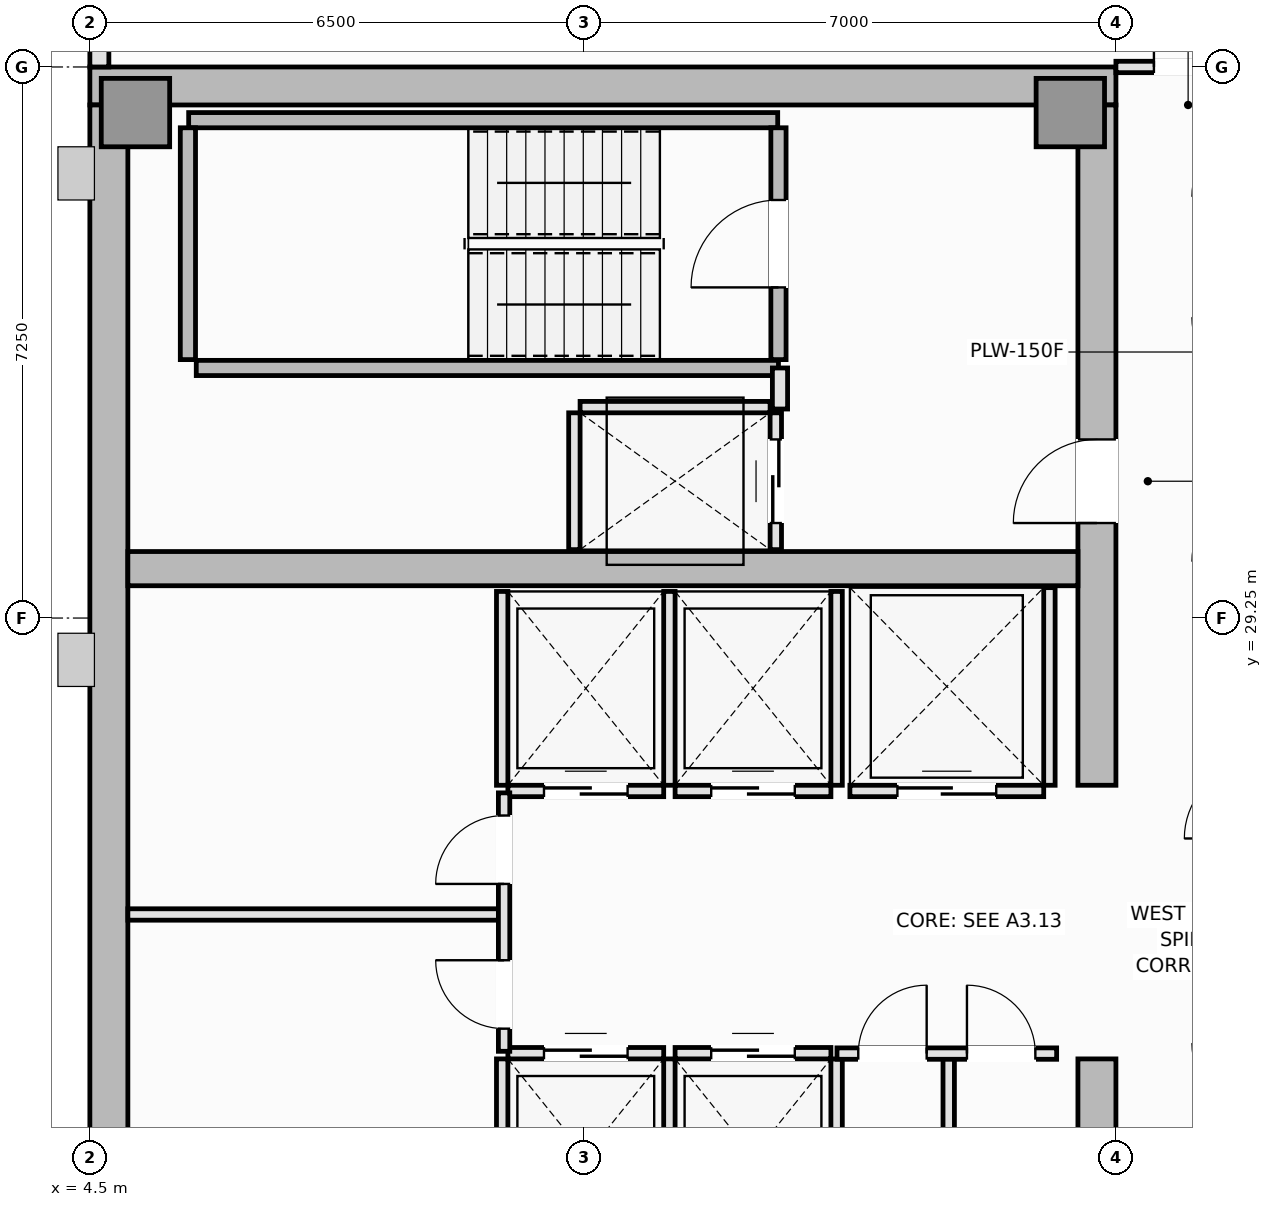
"""IFC4 building model, lengths in metres.
Left out: names, types, materials, properties, quantities, classifications, styles, units other than length and angle.
Written with IfcOpenShell. Run it as: python <this file> out.ifc"""

import sys

from ifc_helpers import new_model, si_unit, direction, frame, frame_2d, origin, origin_2d, place, context, subcontext, project, spatial, rectangle, extrude, element, fill, save


model = new_model("IFC4")
c1 = context("Model", 3, precision=1e-05, world=origin(), true_north=direction((0.0, 1.0)))
c2 = subcontext(c1, "Body", "Model", "MODEL_VIEW")
j1 = project(units=[si_unit("LENGTHUNIT", "METRE"), si_unit("PLANEANGLEUNIT", "RADIAN")], contexts=[c1])
p1 = place(None, origin())
s1 = spatial("IfcSite", under=j1, at=p1, CompositionType="ELEMENT")
p2 = place(p1, origin())
s2 = spatial("IfcBuilding", under=s1, at=p2, CompositionType="ELEMENT")
p3 = place(p2, frame((0.0, 0.0, 270.55)))
s3 = spatial("IfcBuildingStorey", under=s2, at=p3, CompositionType="ELEMENT", Elevation=270.55)
p4 = place(p3, frame((4.5, 36.25, 0.0), z_axis=(0.0, 0.0, 1.0), x_axis=(1.0, 0.0, 0.0)))
e1 = element("IfcWall", 1, at=p4, inside=s3, PredefinedType="SHEAR", context=c2, shape_type="SweptSolid", body=[
    extrude(rectangle(XDim=13.5, YDim=0.5, at=frame_2d((6.75, 0.0))), origin(), (0.0, 0.0, 1.0), 3.55),
])
p5 = place(p3, frame((4.75, 14.5, 0.0), z_axis=(0.0, 0.0, 1.0), x_axis=(0.0, 1.0, 0.0)))
e2 = element("IfcWall", 2, at=p5, inside=s3, PredefinedType="SHEAR", context=c2, shape_type="SweptSolid", body=[
    extrude(rectangle(XDim=21.5, YDim=0.5, at=frame_2d((10.75, 0.0))), origin(), (0.0, 0.0, 1.0), 3.55),
])
p6 = place(p3, frame((17.75, 14.5, 0.0), z_axis=(0.0, 0.0, 1.0), x_axis=(0.0, 1.0, 0.0)))
e3 = element("IfcWall", 3, at=p6, inside=s3, PredefinedType="SHEAR", context=c2, shape_type="SweptSolid", body=[
    extrude(rectangle(XDim=8.95, YDim=0.5, at=frame_2d((4.475, 0.0))), origin(), (0.0, 0.0, 1.0), 3.55),
])
p7 = place(p6, frame((4.4, 0.0, 0.0)))
e4 = element("IfcOpeningElement", 4, at=p7, cuts=e3, PredefinedType="OPENING", context=c2, shape_type="SweptSolid", body=[
    extrude(rectangle(XDim=1.1, YDim=2.15, at=frame_2d((0.55, 1.075))), frame((0.0, 0.26, 0.0), z_axis=(0.0, -1.0, 0.0), x_axis=(1.0, 0.0, 0.0)), (0.0, 0.0, 1.0), 0.52),
])
p8 = place(p3, frame((17.75, 27.05, 0.0), z_axis=(0.0, 0.0, 1.0), x_axis=(0.0, 1.0, 0.0)))
e5 = element("IfcWall", 5, at=p8, inside=s3, PredefinedType="SHEAR", context=c2, shape_type="SweptSolid", body=[
    extrude(rectangle(XDim=8.95, YDim=0.5, at=frame_2d((4.475, 0.0))), origin(), (0.0, 0.0, 1.0), 3.55),
])
p9 = place(p8, frame((3.45, 0.0, 0.0)))
e6 = element("IfcOpeningElement", 6, at=p9, cuts=e5, PredefinedType="OPENING", context=c2, shape_type="SweptSolid", body=[
    extrude(rectangle(XDim=1.1, YDim=2.15, at=frame_2d((0.55, 1.075))), frame((0.0, 0.26, 0.0), z_axis=(0.0, -1.0, 0.0), x_axis=(1.0, 0.0, 0.0)), (0.0, 0.0, 1.0), 0.52),
])
p10 = place(p3, frame((5.0, 29.9, 0.0), z_axis=(0.0, 0.0, 1.0), x_axis=(1.0, 0.0, 0.0)))
e7 = element("IfcWall", 7, at=p10, inside=s3, PredefinedType="SHEAR", context=c2, shape_type="SweptSolid", body=[
    extrude(rectangle(XDim=12.5, YDim=0.45, at=frame_2d((6.25, 0.0))), origin(), (0.0, 0.0, 1.0), 3.55),
])
for number, where, z_axis, x_axis in (
    (8, (5.1, 35.9, 0.0), (0.0, 0.0, 1.0), (1.0, 0.0, 0.0)),
    (9, (17.4, 35.9, 0.0), (0.0, 0.0, 1.0), (1.0, 0.0, 0.0)),
):
    element("IfcColumn", number, at=place(p3, frame(where, z_axis=z_axis, x_axis=x_axis)), inside=s3, PredefinedType="PILASTER", context=c2, shape_type="SweptSolid", body=[
        extrude(rectangle(XDim=0.9, YDim=0.9, at=origin_2d()), origin(), (0.0, 0.0, 1.0), 3.55),
    ])
p11 = place(p3, frame((4.625, 39.4, 0.0), z_axis=(0.0, 0.0, 1.0), x_axis=(0.0, -1.0, 0.0)))
e10 = element("IfcWall", 10, at=p11, inside=s3, PredefinedType="SOLIDWALL", context=c2, shape_type="SweptSolid", body=[
    extrude(rectangle(XDim=2.9, YDim=0.25, at=frame_2d((1.45, 0.0))), origin(), (0.0, 0.0, 1.0), 3.39),
])
p12 = place(p3, frame((5.8, 35.8, 0.0), z_axis=(0.0, 0.0, 1.0), x_axis=(1.0, 0.0, 0.0)))
e11 = element("IfcWall", 11, at=p12, inside=s3, PredefinedType="SOLIDWALL", context=c2, shape_type="SweptSolid", body=[
    extrude(rectangle(XDim=7.75, YDim=0.2, at=frame_2d((3.875, 0.0))), origin(), (0.0, 0.0, 1.0), 3.55),
])
p13 = place(p3, frame((5.79, 32.65, 0.0), z_axis=(0.0, 0.0, 1.0), x_axis=(0.0, 1.0, 0.0)))
e12 = element("IfcWall", 12, at=p13, inside=s3, PredefinedType="SOLIDWALL", context=c2, shape_type="SweptSolid", body=[
    extrude(rectangle(XDim=3.05, YDim=0.2, at=frame_2d((1.525, 0.0))), origin(), (0.0, 0.0, 1.0), 3.55),
])
p14 = place(p3, frame((5.9, 32.54, 0.0), z_axis=(0.0, 0.0, 1.0), x_axis=(1.0, 0.0, 0.0)))
e13 = element("IfcWall", 13, at=p14, inside=s3, PredefinedType="SOLIDWALL", context=c2, shape_type="SweptSolid", body=[
    extrude(rectangle(XDim=7.66, YDim=0.2, at=frame_2d((3.83, 0.0))), origin(), (0.0, 0.0, 1.0), 3.55),
])
p15 = place(p3, frame((13.56, 32.65, 0.0), z_axis=(0.0, 0.0, 1.0), x_axis=(0.0, 1.0, 0.0)))
e14 = element("IfcWall", 14, at=p15, inside=s3, PredefinedType="SOLIDWALL", context=c2, shape_type="SweptSolid", body=[
    extrude(rectangle(XDim=3.05, YDim=0.2, at=frame_2d((1.525, 0.0))), origin(), (0.0, 0.0, 1.0), 3.55),
])
p16 = place(p15, frame((0.95, 0.0, 0.0)))
e15 = element("IfcOpeningElement", 15, at=p16, cuts=e14, PredefinedType="OPENING", context=c2, shape_type="SweptSolid", body=[
    extrude(rectangle(XDim=1.15, YDim=2.15, at=frame_2d((0.575, 1.075))), frame((0.0, 0.11, 0.0), z_axis=(0.0, -1.0, 0.0), x_axis=(1.0, 0.0, 0.0)), (0.0, 0.0, 1.0), 0.22),
])
p17 = place(p3, frame((10.0, 23.525, 0.0), z_axis=(0.0, 0.0, 1.0), x_axis=(1.0, 0.0, 0.0)))
e16 = element("IfcWall", 16, at=p17, inside=s3, PredefinedType="PARTITIONING", context=c2, shape_type="SweptSolid", body=[
    extrude(rectangle(XDim=2.05, YDim=0.15, at=frame_2d((1.025, 0.0))), origin(), (0.0, 0.0, 1.0), 3.39),
])
p18 = place(p17, frame((0.475, 0.0, 0.0)))
e17 = element("IfcOpeningElement", 17, at=p18, cuts=e16, PredefinedType="OPENING", context=c2, shape_type="SweptSolid", body=[
    extrude(rectangle(XDim=1.1, YDim=2.2, at=frame_2d((0.55, 1.1))), frame((0.0, 0.085, 0.0), z_axis=(0.0, -1.0, 0.0), x_axis=(1.0, 0.0, 0.0)), (0.0, 0.0, 1.0), 0.17),
])
for number, where, z_axis, x_axis in (
    (18, (9.925, 20.9, 0.0), (0.0, 0.0, 1.0), (0.0, 1.0, 0.0)),
    (19, (12.125, 20.9, 0.0), (0.0, 0.0, 1.0), (0.0, 1.0, 0.0)),
):
    element("IfcWall", number, at=place(p3, frame(where, z_axis=z_axis, x_axis=x_axis)), inside=s3, PredefinedType="PARTITIONING", context=c2, shape_type="SweptSolid", body=[
        extrude(rectangle(XDim=2.55, YDim=0.15, at=frame_2d((1.275, 0.0))), origin(), (0.0, 0.0, 1.0), 3.39),
    ])
p19 = place(p3, frame((12.2, 23.525, 0.0), z_axis=(0.0, 0.0, 1.0), x_axis=(1.0, 0.0, 0.0)))
e20 = element("IfcWall", 20, at=p19, inside=s3, PredefinedType="PARTITIONING", context=c2, shape_type="SweptSolid", body=[
    extrude(rectangle(XDim=2.05, YDim=0.15, at=frame_2d((1.025, 0.0))), origin(), (0.0, 0.0, 1.0), 3.39),
])
p20 = place(p19, frame((0.475, 0.0, 0.0)))
e21 = element("IfcOpeningElement", 21, at=p20, cuts=e20, PredefinedType="OPENING", context=c2, shape_type="SweptSolid", body=[
    extrude(rectangle(XDim=1.1, YDim=2.2, at=frame_2d((0.55, 1.1))), frame((0.0, 0.085, 0.0), z_axis=(0.0, -1.0, 0.0), x_axis=(1.0, 0.0, 0.0)), (0.0, 0.0, 1.0), 0.17),
])
p21 = place(p3, frame((14.325, 20.9, 0.0), z_axis=(0.0, 0.0, 1.0), x_axis=(0.0, 1.0, 0.0)))
e22 = element("IfcWall", 22, at=p21, inside=s3, PredefinedType="PARTITIONING", context=c2, shape_type="SweptSolid", body=[
    extrude(rectangle(XDim=2.55, YDim=0.15, at=frame_2d((1.275, 0.0))), origin(), (0.0, 0.0, 1.0), 3.39),
])
p22 = place(p3, frame((10.0, 26.975, 0.0), z_axis=(0.0, 0.0, 1.0), x_axis=(1.0, 0.0, 0.0)))
e23 = element("IfcWall", 23, at=p22, inside=s3, PredefinedType="PARTITIONING", context=c2, shape_type="SweptSolid", body=[
    extrude(rectangle(XDim=2.05, YDim=0.15, at=frame_2d((1.025, 0.0))), origin(), (0.0, 0.0, 1.0), 3.39),
])
p23 = place(p22, frame((0.475, 0.0, 0.0)))
e24 = element("IfcOpeningElement", 24, at=p23, cuts=e23, PredefinedType="OPENING", context=c2, shape_type="SweptSolid", body=[
    extrude(rectangle(XDim=1.1, YDim=2.2, at=frame_2d((0.55, 1.1))), frame((0.0, 0.085, 0.0), z_axis=(0.0, -1.0, 0.0), x_axis=(1.0, 0.0, 0.0)), (0.0, 0.0, 1.0), 0.17),
])
for number, where, z_axis, x_axis in (
    (25, (9.925, 27.05, 0.0), (0.0, 0.0, 1.0), (0.0, 1.0, 0.0)),
    (26, (12.125, 27.05, 0.0), (0.0, 0.0, 1.0), (0.0, 1.0, 0.0)),
):
    element("IfcWall", number, at=place(p3, frame(where, z_axis=z_axis, x_axis=x_axis)), inside=s3, PredefinedType="PARTITIONING", context=c2, shape_type="SweptSolid", body=[
        extrude(rectangle(XDim=2.55, YDim=0.15, at=frame_2d((1.275, 0.0))), origin(), (0.0, 0.0, 1.0), 3.39),
    ])
p24 = place(p3, frame((12.2, 26.975, 0.0), z_axis=(0.0, 0.0, 1.0), x_axis=(1.0, 0.0, 0.0)))
e27 = element("IfcWall", 27, at=p24, inside=s3, PredefinedType="PARTITIONING", context=c2, shape_type="SweptSolid", body=[
    extrude(rectangle(XDim=2.05, YDim=0.15, at=frame_2d((1.025, 0.0))), origin(), (0.0, 0.0, 1.0), 3.39),
])
p25 = place(p24, frame((0.475, 0.0, 0.0)))
e28 = element("IfcOpeningElement", 28, at=p25, cuts=e27, PredefinedType="OPENING", context=c2, shape_type="SweptSolid", body=[
    extrude(rectangle(XDim=1.1, YDim=2.2, at=frame_2d((0.55, 1.1))), frame((0.0, 0.085, 0.0), z_axis=(0.0, -1.0, 0.0), x_axis=(1.0, 0.0, 0.0)), (0.0, 0.0, 1.0), 0.17),
])
p26 = place(p3, frame((14.325, 27.05, 0.0), z_axis=(0.0, 0.0, 1.0), x_axis=(0.0, 1.0, 0.0)))
e29 = element("IfcWall", 29, at=p26, inside=s3, PredefinedType="PARTITIONING", context=c2, shape_type="SweptSolid", body=[
    extrude(rectangle(XDim=2.55, YDim=0.15, at=frame_2d((1.275, 0.0))), origin(), (0.0, 0.0, 1.0), 3.39),
])
p27 = place(p3, frame((14.5, 26.975, 0.0), z_axis=(0.0, 0.0, 1.0), x_axis=(1.0, 0.0, 0.0)))
e30 = element("IfcWall", 30, at=p27, inside=s3, PredefinedType="PARTITIONING", context=c2, shape_type="SweptSolid", body=[
    extrude(rectangle(XDim=2.55, YDim=0.15, at=frame_2d((1.275, 0.0))), origin(), (0.0, 0.0, 1.0), 3.39),
])
p28 = place(p27, frame((0.625, 0.0, 0.0)))
e31 = element("IfcOpeningElement", 31, at=p28, cuts=e30, PredefinedType="OPENING", context=c2, shape_type="SweptSolid", body=[
    extrude(rectangle(XDim=1.3, YDim=2.2, at=frame_2d((0.65, 1.1))), frame((0.0, 0.085, 0.0), z_axis=(0.0, -1.0, 0.0), x_axis=(1.0, 0.0, 0.0)), (0.0, 0.0, 1.0), 0.17),
])
p29 = place(p3, frame((17.125, 27.05, 0.0), z_axis=(0.0, 0.0, 1.0), x_axis=(0.0, 1.0, 0.0)))
e32 = element("IfcWall", 32, at=p29, inside=s3, PredefinedType="PARTITIONING", context=c2, shape_type="SweptSolid", body=[
    extrude(rectangle(XDim=2.6, YDim=0.15, at=frame_2d((1.3, 0.0))), origin(), (0.0, 0.0, 1.0), 3.39),
])
p30 = place(p3, frame((10.95, 32.025, 0.0), z_axis=(0.0, 0.0, 1.0), x_axis=(1.0, 0.0, 0.0)))
e33 = element("IfcWall", 33, at=p30, inside=s3, PredefinedType="PARTITIONING", context=c2, shape_type="SweptSolid", body=[
    extrude(rectangle(XDim=2.5, YDim=0.15, at=frame_2d((1.25, 0.0))), origin(), (0.0, 0.0, 1.0), 3.39),
])
p31 = place(p3, frame((10.875, 30.15, 0.0), z_axis=(0.0, 0.0, 1.0), x_axis=(0.0, 1.0, 0.0)))
e34 = element("IfcWall", 34, at=p31, inside=s3, PredefinedType="PARTITIONING", context=c2, shape_type="SweptSolid", body=[
    extrude(rectangle(XDim=1.8, YDim=0.15, at=frame_2d((0.9, 0.0))), origin(), (0.0, 0.0, 1.0), 3.39),
])
p32 = place(p3, frame((13.525, 30.15, 0.0), z_axis=(0.0, 0.0, 1.0), x_axis=(0.0, 1.0, 0.0)))
e35 = element("IfcWall", 35, at=p32, inside=s3, PredefinedType="PARTITIONING", context=c2, shape_type="SweptSolid", body=[
    extrude(rectangle(XDim=1.8, YDim=0.15, at=frame_2d((0.9, 0.0))), origin(), (0.0, 0.0, 1.0), 3.39),
])
p33 = place(p32, frame((0.35, 0.0, 0.0)))
e36 = element("IfcOpeningElement", 36, at=p33, cuts=e35, PredefinedType="OPENING", context=c2, shape_type="SweptSolid", body=[
    extrude(rectangle(XDim=1.1, YDim=2.2, at=frame_2d((0.55, 1.1))), frame((0.0, 0.085, 0.0), z_axis=(0.0, -1.0, 0.0), x_axis=(1.0, 0.0, 0.0)), (0.0, 0.0, 1.0), 0.17),
])
p34 = place(p3, frame((13.58, 32.0, 0.0), z_axis=(0.0, 0.0, 1.0), x_axis=(0.0, 1.0, 0.0)))
e37 = element("IfcWall", 37, at=p34, inside=s3, PredefinedType="PARTITIONING", context=c2, shape_type="SweptSolid", body=[
    extrude(rectangle(XDim=0.54, YDim=0.2, at=frame_2d((0.27, 0.0))), origin(), (0.0, 0.0, 1.0), 3.39),
])
p35 = place(p3, frame((5.0, 25.35, 0.0), z_axis=(0.0, 0.0, 1.0), x_axis=(1.0, 0.0, 0.0)))
e38 = element("IfcWall", 38, at=p35, inside=s3, PredefinedType="PARTITIONING", context=c2, shape_type="SweptSolid", body=[
    extrude(rectangle(XDim=4.95, YDim=0.15, at=frame_2d((2.475, 0.0))), origin(), (0.0, 0.0, 1.0), 3.39),
])
p36 = place(p3, frame((9.95, 23.55, 0.0), z_axis=(0.0, 0.0, 1.0), x_axis=(0.0, 1.0, 0.0)))
e39 = element("IfcWall", 39, at=p36, inside=s3, PredefinedType="PARTITIONING", context=c2, shape_type="SweptSolid", body=[
    extrude(rectangle(XDim=3.4, YDim=0.15, at=frame_2d((1.7, 0.0))), origin(), (0.0, 0.0, 1.0), 3.39),
])
p37 = place(p36, frame((0.298, 0.0, 0.0)))
e40 = element("IfcOpeningElement", 40, at=p37, cuts=e39, PredefinedType="OPENING", context=c2, shape_type="SweptSolid", body=[
    extrude(rectangle(XDim=0.9, YDim=2.1, at=frame_2d((0.45, 1.05))), frame((0.0, 0.085, 0.0), z_axis=(0.0, -1.0, 0.0), x_axis=(1.0, 0.0, 0.0)), (0.0, 0.0, 1.0), 0.17),
])
p38 = place(p36, frame((2.202, 0.0, 0.0)))
e41 = element("IfcOpeningElement", 41, at=p38, cuts=e39, PredefinedType="OPENING", context=c2, shape_type="SweptSolid", body=[
    extrude(rectangle(XDim=0.9, YDim=2.1, at=frame_2d((0.45, 1.05))), frame((0.0, 0.085, 0.0), z_axis=(0.0, -1.0, 0.0), x_axis=(1.0, 0.0, 0.0)), (0.0, 0.0, 1.0), 0.17),
])
p39 = place(p3, frame((15.8, 20.85, 0.0), z_axis=(0.0, 0.0, 1.0), x_axis=(0.0, 1.0, 0.0)))
e42 = element("IfcWall", 42, at=p39, inside=s3, PredefinedType="PARTITIONING", context=c2, shape_type="SweptSolid", body=[
    extrude(rectangle(XDim=2.67, YDim=0.15, at=frame_2d((1.335, 0.0))), origin(), (0.0, 0.0, 1.0), 3.39),
])
p40 = place(p3, frame((14.33, 23.52, 0.0), z_axis=(0.0, 0.0, 1.0), x_axis=(1.0, 0.0, 0.0)))
e43 = element("IfcWall", 43, at=p40, inside=s3, PredefinedType="PARTITIONING", context=c2, shape_type="SweptSolid", body=[
    extrude(rectangle(XDim=2.89, YDim=0.15, at=frame_2d((1.445, 0.0))), origin(), (0.0, 0.0, 1.0), 3.39),
])
p41 = place(p40, frame((0.28, 0.0, 0.0)))
e44 = element("IfcOpeningElement", 44, at=p41, cuts=e43, PredefinedType="OPENING", context=c2, shape_type="SweptSolid", body=[
    extrude(rectangle(XDim=0.9, YDim=2.1, at=frame_2d((0.45, 1.05))), frame((0.0, 0.085, 0.0), z_axis=(0.0, -1.0, 0.0), x_axis=(1.0, 0.0, 0.0)), (0.0, 0.0, 1.0), 0.17),
])
p42 = place(p40, frame((1.71, 0.0, 0.0)))
e45 = element("IfcOpeningElement", 45, at=p42, cuts=e43, PredefinedType="OPENING", context=c2, shape_type="SweptSolid", body=[
    extrude(rectangle(XDim=0.9, YDim=2.1, at=frame_2d((0.45, 1.05))), frame((0.0, 0.085, 0.0), z_axis=(0.0, -1.0, 0.0), x_axis=(1.0, 0.0, 0.0)), (0.0, 0.0, 1.0), 0.17),
])
p43 = place(p3, frame((18.0, 36.5, 0.0), z_axis=(0.0, 0.0, 1.0), x_axis=(1.0, 0.0, 0.0)))
e46 = element("IfcWall", 46, at=p43, inside=s3, PredefinedType="PARTITIONING", context=c2, shape_type="SweptSolid", body=[
    extrude(rectangle(XDim=1.9, YDim=0.15, at=frame_2d((0.95, 0.0))), origin(), (0.0, 0.0, 1.0), 3.39),
])
p44 = place(p43, frame((0.5, 0.0, 0.0)))
e47 = element("IfcOpeningElement", 47, at=p44, cuts=e46, PredefinedType="OPENING", context=c2, shape_type="SweptSolid", body=[
    extrude(rectangle(XDim=0.9, YDim=2.1, at=frame_2d((0.45, 1.05))), frame((0.0, 0.085, 0.0), z_axis=(0.0, -1.0, 0.0), x_axis=(1.0, 0.0, 0.0)), (0.0, 0.0, 1.0), 0.17),
])
p45 = place(p16, origin())
e48 = element("IfcDoor", 48, at=p45, inside=s3, OperationType="SINGLE_SWING_LEFT", PredefinedType="DOOR", context=c2, shape_type="SweptSolid", body=[
    extrude(rectangle(XDim=1.15, YDim=2.15, at=frame_2d((0.575, 1.075))), frame((0.0, 0.025, 0.0), z_axis=(0.0, -1.0, 0.0), x_axis=(1.0, 0.0, 0.0)), (0.0, 0.0, 1.0), 0.05),
])
fill(e15, e48)
p46 = place(p18, origin())
e49 = element("IfcDoor", 49, at=p46, inside=s3, OperationType="DOUBLE_DOOR_SLIDING", PredefinedType="DOOR", context=c2, shape_type="SweptSolid", body=[
    extrude(rectangle(XDim=1.1, YDim=2.2, at=frame_2d((0.55, 1.1))), frame((0.0, 0.025, 0.0), z_axis=(0.0, -1.0, 0.0), x_axis=(1.0, 0.0, 0.0)), (0.0, 0.0, 1.0), 0.05),
])
fill(e17, e49)
p47 = place(p20, origin())
e50 = element("IfcDoor", 50, at=p47, inside=s3, OperationType="DOUBLE_DOOR_SLIDING", PredefinedType="DOOR", context=c2, shape_type="SweptSolid", body=[
    extrude(rectangle(XDim=1.1, YDim=2.2, at=frame_2d((0.55, 1.1))), frame((0.0, 0.025, 0.0), z_axis=(0.0, -1.0, 0.0), x_axis=(1.0, 0.0, 0.0)), (0.0, 0.0, 1.0), 0.05),
])
fill(e21, e50)
p48 = place(p23, origin())
e51 = element("IfcDoor", 51, at=p48, inside=s3, OperationType="DOUBLE_DOOR_SLIDING", PredefinedType="DOOR", context=c2, shape_type="SweptSolid", body=[
    extrude(rectangle(XDim=1.1, YDim=2.2, at=frame_2d((0.55, 1.1))), frame((0.0, 0.025, 0.0), z_axis=(0.0, -1.0, 0.0), x_axis=(1.0, 0.0, 0.0)), (0.0, 0.0, 1.0), 0.05),
])
fill(e24, e51)
p49 = place(p25, origin())
e52 = element("IfcDoor", 52, at=p49, inside=s3, OperationType="DOUBLE_DOOR_SLIDING", PredefinedType="DOOR", context=c2, shape_type="SweptSolid", body=[
    extrude(rectangle(XDim=1.1, YDim=2.2, at=frame_2d((0.55, 1.1))), frame((0.0, 0.025, 0.0), z_axis=(0.0, -1.0, 0.0), x_axis=(1.0, 0.0, 0.0)), (0.0, 0.0, 1.0), 0.05),
])
fill(e28, e52)
p50 = place(p28, origin())
e53 = element("IfcDoor", 53, at=p50, inside=s3, OperationType="DOUBLE_DOOR_SLIDING", PredefinedType="DOOR", context=c2, shape_type="SweptSolid", body=[
    extrude(rectangle(XDim=1.3, YDim=2.2, at=frame_2d((0.65, 1.1))), frame((0.0, 0.025, 0.0), z_axis=(0.0, -1.0, 0.0), x_axis=(1.0, 0.0, 0.0)), (0.0, 0.0, 1.0), 0.05),
])
fill(e31, e53)
p51 = place(p33, origin())
e54 = element("IfcDoor", 54, at=p51, inside=s3, OperationType="DOUBLE_DOOR_SLIDING", PredefinedType="DOOR", context=c2, shape_type="SweptSolid", body=[
    extrude(rectangle(XDim=1.1, YDim=2.2, at=frame_2d((0.55, 1.1))), frame((0.0, 0.025, 0.0), z_axis=(0.0, -1.0, 0.0), x_axis=(1.0, 0.0, 0.0)), (0.0, 0.0, 1.0), 0.05),
])
fill(e36, e54)
p52 = place(p9, origin())
e55 = element("IfcDoor", 55, at=p52, inside=s3, OperationType="SINGLE_SWING_LEFT", PredefinedType="DOOR", context=c2, shape_type="SweptSolid", body=[
    extrude(rectangle(XDim=1.1, YDim=2.15, at=frame_2d((0.55, 1.075))), frame((0.0, 0.025, 0.0), z_axis=(0.0, -1.0, 0.0), x_axis=(1.0, 0.0, 0.0)), (0.0, 0.0, 1.0), 0.05),
])
fill(e6, e55)
p53 = place(p37, origin())
e56 = element("IfcDoor", 56, at=p53, inside=s3, OperationType="SINGLE_SWING_RIGHT", PredefinedType="DOOR", context=c2, shape_type="SweptSolid", body=[
    extrude(rectangle(XDim=0.9, YDim=2.1, at=frame_2d((0.45, 1.05))), frame((0.0, 0.025, 0.0), z_axis=(0.0, -1.0, 0.0), x_axis=(1.0, 0.0, 0.0)), (0.0, 0.0, 1.0), 0.05),
])
fill(e40, e56)
p54 = place(p38, origin())
e57 = element("IfcDoor", 57, at=p54, inside=s3, OperationType="SINGLE_SWING_LEFT", PredefinedType="DOOR", context=c2, shape_type="SweptSolid", body=[
    extrude(rectangle(XDim=0.9, YDim=2.1, at=frame_2d((0.45, 1.05))), frame((0.0, 0.025, 0.0), z_axis=(0.0, -1.0, 0.0), x_axis=(1.0, 0.0, 0.0)), (0.0, 0.0, 1.0), 0.05),
])
fill(e41, e57)
p55 = place(p41, origin())
e58 = element("IfcDoor", 58, at=p55, inside=s3, OperationType="SINGLE_SWING_RIGHT", PredefinedType="DOOR", context=c2, shape_type="SweptSolid", body=[
    extrude(rectangle(XDim=0.9, YDim=2.1, at=frame_2d((0.45, 1.05))), frame((0.0, 0.025, 0.0), z_axis=(0.0, -1.0, 0.0), x_axis=(1.0, 0.0, 0.0)), (0.0, 0.0, 1.0), 0.05),
])
fill(e44, e58)
p56 = place(p42, origin())
e59 = element("IfcDoor", 59, at=p56, inside=s3, OperationType="SINGLE_SWING_LEFT", PredefinedType="DOOR", context=c2, shape_type="SweptSolid", body=[
    extrude(rectangle(XDim=0.9, YDim=2.1, at=frame_2d((0.45, 1.05))), frame((0.0, 0.025, 0.0), z_axis=(0.0, -1.0, 0.0), x_axis=(1.0, 0.0, 0.0)), (0.0, 0.0, 1.0), 0.05),
])
fill(e45, e59)
p57 = place(p44, origin())
e60 = element("IfcDoor", 60, at=p57, inside=s3, OperationType="SINGLE_SWING_LEFT", PredefinedType="DOOR", context=c2, shape_type="SweptSolid", body=[
    extrude(rectangle(XDim=0.9, YDim=2.1, at=frame_2d((0.45, 1.05))), frame((0.0, 0.025, 0.0), z_axis=(0.0, -1.0, 0.0), x_axis=(1.0, 0.0, 0.0)), (0.0, 0.0, 1.0), 0.05),
])
fill(e47, e60)
save(model, sys.argv[1])
